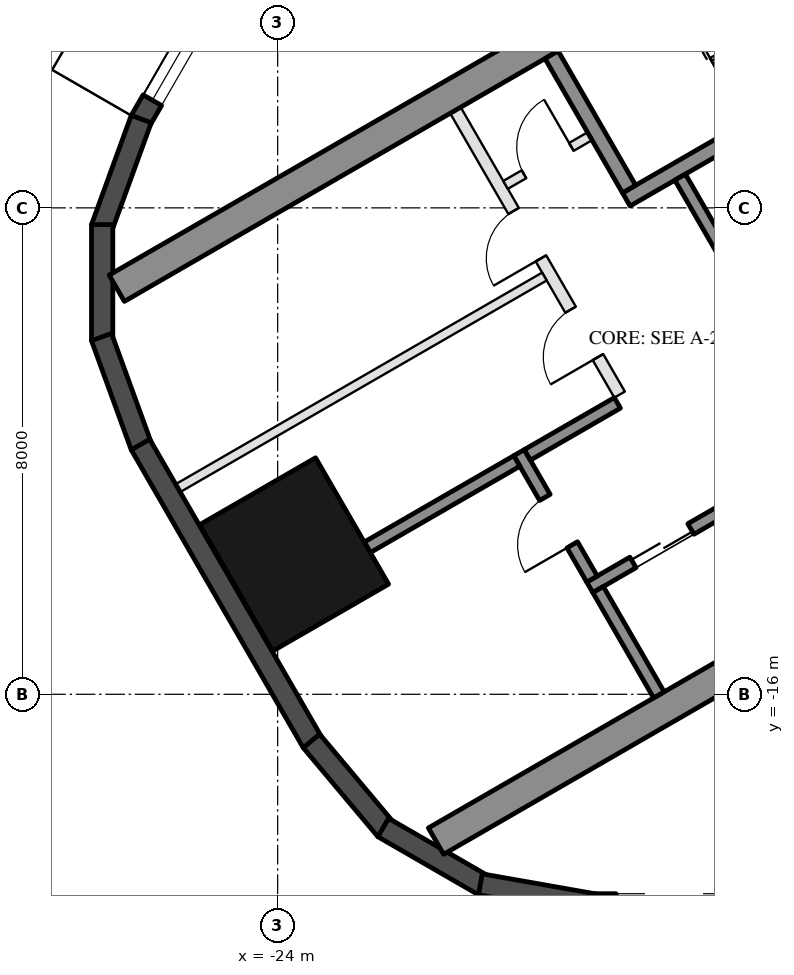
"""IFC4 building model, lengths in metres.
Left out: names, types, materials, properties, quantities, classifications, styles, units other than length and angle.
Written with IfcOpenShell. Run it as: python <this file> out.ifc"""

import sys

from ifc_helpers import new_model, si_unit, direction, frame, frame_2d, origin, origin_2d, place, context, subcontext, project, spatial, rectangle, hollow_rectangle, extrude, element, fill, save


model = new_model("IFC4")
c1 = context("Model", 3, precision=1e-05, world=origin(), true_north=direction((0.0, 1.0)))
c2 = subcontext(c1, "Body", "Model", "MODEL_VIEW")
j1 = project(units=[si_unit("LENGTHUNIT", "METRE"), si_unit("PLANEANGLEUNIT", "RADIAN")], contexts=[c1])
p1 = place(None, origin())
s1 = spatial("IfcSite", under=j1, at=p1, CompositionType="ELEMENT")
p2 = place(p1, origin())
s2 = spatial("IfcBuilding", under=s1, at=p2, CompositionType="ELEMENT")
p3 = place(p2, frame((0.0, 0.0, 187.3)))
s3 = spatial("IfcBuildingStorey", under=s2, at=p3, CompositionType="ELEMENT", Elevation=187.3)
p4 = place(p3, frame((-23.729, -13.7, 0.0), z_axis=(0.0, 0.0, 1.0), x_axis=(-0.5, 0.866025403784, 0.0)))
e1 = element("IfcColumn", 1, at=p4, inside=s3, PredefinedType="COLUMN", context=c2, shape_type="SweptSolid", body=[
    extrude(hollow_rectangle(XDim=2.4, YDim=2.2, WallThickness=0.06, at=origin_2d()), origin(), (0.0, 0.0, 1.0), 3.7),
])
p5 = place(p3, frame((-24.299, -3.176, 0.0), z_axis=(0.0, 0.0, 1.0), x_axis=(-0.500028278809, -0.866009076391, 0.0)))
e2 = element("IfcWall", 2, at=p5, inside=s3, PredefinedType="SOLIDWALL", context=c2, shape_type="SweptSolid", body=[
    extrude(rectangle(XDim=3.916, YDim=0.35, at=frame_2d((1.958, 0.0))), origin(), (0.0, 0.0, 1.0), 3.55),
])
p6 = place(p5, frame((1.625, 0.0, 0.3)))
e3 = element("IfcOpeningElement", 3, at=p6, cuts=e2, PredefinedType="OPENING", context=c2, shape_type="SweptSolid", body=[
    extrude(rectangle(XDim=1.9, YDim=2.65, at=frame_2d((0.95, 1.325))), frame((0.0, 0.185, 0.0), z_axis=(0.0, -1.0, 0.0), x_axis=(1.0, 0.0, 0.0)), (0.0, 0.0, 1.0), 0.37),
])
for number, where, z_axis, x_axis in (
    (4, (-26.244, -6.54, 0.0), (0.0, 0.0, 1.0), (-0.342, -0.94, 0.0)),
    (5, (-26.886, -8.275, 0.0), (0.0, 0.0, 1.0), (0.0, -1.0, 0.0)),
    (6, (-26.897, -10.125, 0.0), (0.0, 0.0, 1.0), (0.342, -0.94, 0.0)),
):
    element("IfcWall", number, at=place(p3, frame(where, z_axis=z_axis, x_axis=x_axis)), inside=s3, PredefinedType="SOLIDWALL", context=c2, shape_type="SweptSolid", body=[
        extrude(rectangle(XDim=1.91, YDim=0.35, at=frame_2d((0.955, 0.0))), origin(), (0.0, 0.0, 1.0), 3.55),
    ])
p7 = place(p3, frame((-26.257, -11.893, 0.0), z_axis=(0.0, 0.0, 1.0), x_axis=(0.500018773155, -0.866014564827, 0.0)))
e7 = element("IfcWall", 7, at=p7, inside=s3, PredefinedType="SOLIDWALL", context=c2, shape_type="SweptSolid", body=[
    extrude(rectangle(XDim=5.658, YDim=0.35, at=frame_2d((2.829, 0.0))), origin(), (0.0, 0.0, 1.0), 3.55),
])
for number, where, z_axis, x_axis in (
    (8, (-23.445, -16.768, 0.0), (0.0, 0.0, 1.0), (0.643, -0.766, 0.0)),
    (9, (-22.264, -18.192, 0.0), (0.0, 0.0, 1.0), (0.866, -0.5, 0.0)),
):
    element("IfcWall", number, at=place(p3, frame(where, z_axis=z_axis, x_axis=x_axis)), inside=s3, PredefinedType="SOLIDWALL", context=c2, shape_type="SweptSolid", body=[
        extrude(rectangle(XDim=1.91, YDim=0.35, at=frame_2d((0.955, 0.0))), origin(), (0.0, 0.0, 1.0), 3.55),
    ])
p8 = place(p3, frame((-20.667, -19.126, 0.0), z_axis=(0.0, 0.0, 1.0), x_axis=(0.984798995425, -0.173697837091, 0.0)))
e10 = element("IfcWall", 10, at=p8, inside=s3, PredefinedType="SOLIDWALL", context=c2, shape_type="SweptSolid", body=[
    extrude(rectangle(XDim=1.91, YDim=0.35, at=frame_2d((0.955, 0.0))), origin(), (0.0, 0.0, 1.0), 3.55),
])
p9 = place(p3, frame((-18.816, -19.455, 0.0), z_axis=(0.0, 0.0, 1.0), x_axis=(1.0, 0.0, 0.0)))
e11 = element("IfcWall", 11, at=p9, inside=s3, PredefinedType="SOLIDWALL", context=c2, shape_type="SweptSolid", body=[
    extrude(rectangle(XDim=11.816, YDim=0.35, at=frame_2d((5.908, 0.0))), origin(), (0.0, 0.0, 1.0), 3.55),
])
p10 = place(p9, frame((0.381, 0.0, 0.3)))
e12 = element("IfcOpeningElement", 12, at=p10, cuts=e11, PredefinedType="OPENING", context=c2, shape_type="SweptSolid", body=[
    extrude(rectangle(XDim=1.9, YDim=2.65, at=frame_2d((0.95, 1.325))), frame((0.0, 0.185, 0.0), z_axis=(0.0, -1.0, 0.0), x_axis=(1.0, 0.0, 0.0)), (0.0, 0.0, 1.0), 0.37),
])
p11 = place(p9, frame((7.79, 0.0, 0.0)))
e13 = element("IfcOpeningElement", 13, at=p11, cuts=e11, PredefinedType="OPENING", context=c2, shape_type="SweptSolid", body=[
    extrude(rectangle(XDim=2.4, YDim=2.4, at=frame_2d((1.2, 1.2))), frame((0.0, 0.185, 0.0), z_axis=(0.0, -1.0, 0.0), x_axis=(1.0, 0.0, 0.0)), (0.0, 0.0, 1.0), 0.37),
])
p12 = place(p9, frame((3.741, 0.0, 0.3)))
e14 = element("IfcOpeningElement", 14, at=p12, cuts=e11, PredefinedType="OPENING", context=c2, shape_type="SweptSolid", body=[
    extrude(rectangle(XDim=1.7, YDim=2.65, at=frame_2d((0.85, 1.325))), frame((0.0, 0.185, 0.0), z_axis=(0.0, -1.0, 0.0), x_axis=(1.0, 0.0, 0.0)), (0.0, 0.0, 1.0), 0.37),
])
p13 = place(p9, frame((5.741, 0.0, 0.3)))
e15 = element("IfcOpeningElement", 15, at=p13, cuts=e11, PredefinedType="OPENING", context=c2, shape_type="SweptSolid", body=[
    extrude(rectangle(XDim=1.7, YDim=2.65, at=frame_2d((0.85, 1.325))), frame((0.0, 0.185, 0.0), z_axis=(0.0, -1.0, 0.0), x_axis=(1.0, 0.0, 0.0)), (0.0, 0.0, 1.0), 0.37),
])
for number, where, z_axis, x_axis in (
    (16, (-13.797, -1.903, 0.0), (0.0, 0.0, 1.0), (-0.866, -0.5, 0.0)),
    (17, (-8.547, -10.997, 0.0), (0.0, 0.0, 1.0), (-0.866, -0.5, 0.0)),
):
    element("IfcWall", number, at=place(p3, frame(where, z_axis=z_axis, x_axis=x_axis)), inside=s3, PredefinedType="SHEAR", context=c2, shape_type="SweptSolid", body=[
        extrude(rectangle(XDim=14.837, YDim=0.5, at=frame_2d((7.418, 0.0))), origin(), (0.0, 0.0, 1.0), 3.5),
    ])
p14 = place(p3, frame((-12.681, -4.636, 0.0), z_axis=(0.0, 0.0, 1.0), x_axis=(-0.866021702275, -0.500006411147, 0.0)))
e18 = element("IfcWall", 18, at=p14, inside=s3, PredefinedType="SHEAR", context=c2, shape_type="SweptSolid", body=[
    extrude(rectangle(XDim=6.45, YDim=0.25, at=frame_2d((3.225, 0.0))), origin(), (0.0, 0.0, 1.0), 3.5),
])
p15 = place(p14, frame((0.3, 0.0, 0.0)))
e19 = element("IfcOpeningElement", 19, at=p15, cuts=e18, PredefinedType="OPENING", context=c2, shape_type="SweptSolid", body=[
    extrude(rectangle(XDim=1.0, YDim=2.1, at=frame_2d((0.5, 1.05))), frame((0.0, 0.135, 0.0), z_axis=(0.0, -1.0, 0.0), x_axis=(1.0, 0.0, 0.0)), (0.0, 0.0, 1.0), 0.27),
])
p16 = place(p3, frame((-19.496, -5.482, 0.0), z_axis=(0.0, 0.0, 1.0), x_axis=(0.499990435942, -0.866030925526, 0.0)))
e20 = element("IfcWall", 20, at=p16, inside=s3, PredefinedType="SHEAR", context=c2, shape_type="SweptSolid", body=[
    extrude(rectangle(XDim=2.55, YDim=0.25, at=frame_2d((1.275, 0.0))), origin(), (0.0, 0.0, 1.0), 3.5),
])
p17 = place(p3, frame((-17.381, -7.495, 0.0), z_axis=(0.0, 0.0, 1.0), x_axis=(0.500011755427, -0.866018616679, 0.0)))
e21 = element("IfcWall", 21, at=p17, inside=s3, PredefinedType="SHEAR", context=c2, shape_type="SweptSolid", body=[
    extrude(rectangle(XDim=2.8, YDim=0.2, at=frame_2d((1.4, 0.0))), origin(), (0.0, 0.0, 1.0), 3.5),
])
p18 = place(p3, frame((-10.068, -9.162, 0.0), z_axis=(0.0, 0.0, 1.0), x_axis=(-0.866032725843, -0.499987317609, 0.0)))
e22 = element("IfcWall", 22, at=p18, inside=s3, PredefinedType="SHEAR", context=c2, shape_type="SweptSolid", body=[
    extrude(rectangle(XDim=10.16, YDim=0.2, at=frame_2d((5.08, 0.0))), origin(), (0.0, 0.0, 1.0), 3.5),
])
p19 = place(p18, frame((0.62, 0.0, 0.0)))
e23 = element("IfcOpeningElement", 23, at=p19, cuts=e22, PredefinedType="OPENING", context=c2, shape_type="SweptSolid", body=[
    extrude(rectangle(XDim=1.1, YDim=2.1, at=frame_2d((0.55, 1.05))), frame((0.0, 0.11, 0.0), z_axis=(0.0, -1.0, 0.0), x_axis=(1.0, 0.0, 0.0)), (0.0, 0.0, 1.0), 0.22),
])
p20 = place(p18, frame((3.16, 0.0, 0.0)))
e24 = element("IfcOpeningElement", 24, at=p20, cuts=e22, PredefinedType="OPENING", context=c2, shape_type="SweptSolid", body=[
    extrude(rectangle(XDim=1.1, YDim=2.1, at=frame_2d((0.55, 1.05))), frame((0.0, 0.11, 0.0), z_axis=(0.0, -1.0, 0.0), x_axis=(1.0, 0.0, 0.0)), (0.0, 0.0, 1.0), 0.22),
])
p21 = place(p18, frame((5.7, 0.0, 0.0)))
e25 = element("IfcOpeningElement", 25, at=p21, cuts=e22, PredefinedType="OPENING", context=c2, shape_type="SweptSolid", body=[
    extrude(rectangle(XDim=1.1, YDim=2.1, at=frame_2d((0.55, 1.05))), frame((0.0, 0.11, 0.0), z_axis=(0.0, -1.0, 0.0), x_axis=(1.0, 0.0, 0.0)), (0.0, 0.0, 1.0), 0.22),
])
p22 = place(p18, frame((8.24, 0.0, 0.0)))
e26 = element("IfcOpeningElement", 26, at=p22, cuts=e22, PredefinedType="OPENING", context=c2, shape_type="SweptSolid", body=[
    extrude(rectangle(XDim=1.1, YDim=2.1, at=frame_2d((0.55, 1.05))), frame((0.0, 0.11, 0.0), z_axis=(0.0, -1.0, 0.0), x_axis=(1.0, 0.0, 0.0)), (0.0, 0.0, 1.0), 0.22),
])
p23 = place(p3, frame((-20.031, -12.026, 0.0), z_axis=(0.0, 0.0, 1.0), x_axis=(0.500033551112, -0.866006032174, 0.0)))
e27 = element("IfcWall", 27, at=p23, inside=s3, PredefinedType="SHEAR", context=c2, shape_type="SweptSolid", body=[
    extrude(rectangle(XDim=2.4, YDim=0.2, at=frame_2d((1.2, 0.0))), origin(), (0.0, 0.0, 1.0), 3.5),
])
p24 = place(p23, frame((0.85, 0.0, 0.0)))
e28 = element("IfcOpeningElement", 28, at=p24, cuts=e27, PredefinedType="OPENING", context=c2, shape_type="SweptSolid", body=[
    extrude(rectangle(XDim=0.9, YDim=2.1, at=frame_2d((0.45, 1.05))), frame((0.0, 0.11, 0.0), z_axis=(0.0, -1.0, 0.0), x_axis=(1.0, 0.0, 0.0)), (0.0, 0.0, 1.0), 0.22),
])
p25 = place(p3, frame((-18.413, -11.208, 0.0), z_axis=(0.0, 0.0, 1.0), x_axis=(-0.866038183914, -0.499977863513, 0.0)))
e29 = element("IfcWall", 29, at=p25, inside=s3, PredefinedType="SHEAR", context=c2, shape_type="SweptSolid", body=[
    extrude(rectangle(XDim=1.71, YDim=0.2, at=frame_2d((0.855, 0.0))), origin(), (0.0, 0.0, 1.0), 3.5),
])
p26 = place(p3, frame((-18.73, -14.278, 0.0), z_axis=(0.0, 0.0, 1.0), x_axis=(0.50002537861, -0.866010750942, 0.0)))
e30 = element("IfcWall", 30, at=p26, inside=s3, PredefinedType="SHEAR", context=c2, shape_type="SweptSolid", body=[
    extrude(rectangle(XDim=2.0, YDim=0.2, at=frame_2d((1.0, 0.0))), origin(), (0.0, 0.0, 1.0), 3.5),
])
p27 = place(p3, frame((-20.067, -12.163, 0.0), z_axis=(0.0, 0.0, 1.0), x_axis=(-0.866055327414, -0.49994816717, 0.0)))
e31 = element("IfcWall", 31, at=p27, inside=s3, PredefinedType="SHEAR", context=c2, shape_type="SweptSolid", body=[
    extrude(rectangle(XDim=2.84, YDim=0.2, at=frame_2d((1.42, 0.0))), origin(), (0.0, 0.0, 1.0), 3.5),
])
p28 = place(p3, frame((-21.076, -6.395, 0.0), z_axis=(0.0, 0.0, 1.0), x_axis=(0.50001468107, -0.866016927499, 0.0)))
e32 = element("IfcWall", 32, at=p28, inside=s3, PredefinedType="PARTITIONING", context=c2, shape_type="SweptSolid", body=[
    extrude(rectangle(XDim=5.4, YDim=0.2, at=frame_2d((2.7, 0.0))), origin(), (0.0, 0.0, 1.0), 3.5),
])
p29 = place(p28, frame((1.913, 0.0, 0.0)))
e33 = element("IfcOpeningElement", 33, at=p29, cuts=e32, PredefinedType="OPENING", context=c2, shape_type="SweptSolid", body=[
    extrude(rectangle(XDim=0.9, YDim=2.1, at=frame_2d((0.45, 1.05))), frame((0.0, 0.11, 0.0), z_axis=(0.0, -1.0, 0.0), x_axis=(1.0, 0.0, 0.0)), (0.0, 0.0, 1.0), 0.22),
])
p30 = place(p28, frame((3.788, 0.0, 0.0)))
e34 = element("IfcOpeningElement", 34, at=p30, cuts=e32, PredefinedType="OPENING", context=c2, shape_type="SweptSolid", body=[
    extrude(rectangle(XDim=0.9, YDim=2.1, at=frame_2d((0.45, 1.05))), frame((0.0, 0.11, 0.0), z_axis=(0.0, -1.0, 0.0), x_axis=(1.0, 0.0, 0.0)), (0.0, 0.0, 1.0), 0.22),
])
p31 = place(p3, frame((-18.866, -6.822, 0.0), z_axis=(0.0, 0.0, 1.0), x_axis=(-0.866028054938, -0.499995408039, 0.0)))
e35 = element("IfcWall", 35, at=p31, inside=s3, PredefinedType="PARTITIONING", context=c2, shape_type="SweptSolid", body=[
    extrude(rectangle(XDim=1.6, YDim=0.15, at=frame_2d((0.8, 0.0))), origin(), (0.0, 0.0, 1.0), 3.5),
])
p32 = place(p31, frame((0.35, 0.0, 0.0)))
e36 = element("IfcOpeningElement", 36, at=p32, cuts=e35, PredefinedType="OPENING", context=c2, shape_type="SweptSolid", body=[
    extrude(rectangle(XDim=0.9, YDim=2.1, at=frame_2d((0.45, 1.05))), frame((0.0, 0.085, 0.0), z_axis=(0.0, -1.0, 0.0), x_axis=(1.0, 0.0, 0.0)), (0.0, 0.0, 1.0), 0.17),
])
p33 = place(p3, frame((-19.613, -9.13, 0.0), z_axis=(0.0, 0.0, 1.0), x_axis=(-0.866031734426, -0.499989034847, 0.0)))
e37 = element("IfcWall", 37, at=p33, inside=s3, PredefinedType="PARTITIONING", context=c2, shape_type="SweptSolid", body=[
    extrude(rectangle(XDim=6.95, YDim=0.15, at=frame_2d((3.475, 0.0))), origin(), (0.0, 0.0, 1.0), 3.5),
])
p34 = place(p6, origin())
e38 = element("IfcWindow", 38, at=p34, inside=s3, PartitioningType="SINGLE_PANEL", PredefinedType="WINDOW", context=c2, shape_type="SweptSolid", body=[
    extrude(rectangle(XDim=1.9, YDim=2.65, at=frame_2d((0.95, 1.325))), frame((0.0, 0.03, 0.0), z_axis=(0.0, -1.0, 0.0), x_axis=(1.0, 0.0, 0.0)), (0.0, 0.0, 1.0), 0.06),
])
fill(e3, e38)
p35 = place(p32, frame((0.9, 0.0, 0.0), z_axis=(0.0, 0.0, 1.0), x_axis=(-1.0, 0.0, 0.0)))
e39 = element("IfcDoor", 39, at=p35, inside=s3, OperationType="SINGLE_SWING_RIGHT", PredefinedType="DOOR", context=c2, shape_type="SweptSolid", body=[
    extrude(rectangle(XDim=0.9, YDim=2.1, at=frame_2d((0.45, 1.05))), frame((0.0, 0.025, 0.0), z_axis=(0.0, -1.0, 0.0), x_axis=(1.0, 0.0, 0.0)), (0.0, 0.0, 1.0), 0.05),
])
fill(e36, e39)
p36 = place(p22, origin())
e40 = element("IfcDoor", 40, at=p36, inside=s3, OperationType="DOUBLE_DOOR_SLIDING", PredefinedType="DOOR", context=c2, shape_type="SweptSolid", body=[
    extrude(rectangle(XDim=1.1, YDim=2.1, at=frame_2d((0.55, 1.05))), frame((0.0, 0.025, 0.0), z_axis=(0.0, -1.0, 0.0), x_axis=(1.0, 0.0, 0.0)), (0.0, 0.0, 1.0), 0.05),
])
fill(e26, e40)
p37 = place(p24, frame((0.9, 0.0, 0.0), z_axis=(0.0, 0.0, 1.0), x_axis=(-1.0, 0.0, 0.0)))
e41 = element("IfcDoor", 41, at=p37, inside=s3, OperationType="SINGLE_SWING_LEFT", PredefinedType="DOOR", context=c2, shape_type="SweptSolid", body=[
    extrude(rectangle(XDim=0.9, YDim=2.1, at=frame_2d((0.45, 1.05))), frame((0.0, 0.025, 0.0), z_axis=(0.0, -1.0, 0.0), x_axis=(1.0, 0.0, 0.0)), (0.0, 0.0, 1.0), 0.05),
])
fill(e28, e41)
p38 = place(p29, frame((0.9, 0.0, 0.0), z_axis=(0.0, 0.0, 1.0), x_axis=(-1.0, 0.0, 0.0)))
e42 = element("IfcDoor", 42, at=p38, inside=s3, OperationType="SINGLE_SWING_LEFT", PredefinedType="DOOR", context=c2, shape_type="SweptSolid", body=[
    extrude(rectangle(XDim=0.9, YDim=2.1, at=frame_2d((0.45, 1.05))), frame((0.0, 0.025, 0.0), z_axis=(0.0, -1.0, 0.0), x_axis=(1.0, 0.0, 0.0)), (0.0, 0.0, 1.0), 0.05),
])
fill(e33, e42)
p39 = place(p30, frame((0.9, 0.0, 0.0), z_axis=(0.0, 0.0, 1.0), x_axis=(-1.0, 0.0, 0.0)))
e43 = element("IfcDoor", 43, at=p39, inside=s3, OperationType="SINGLE_SWING_LEFT", PredefinedType="DOOR", context=c2, shape_type="SweptSolid", body=[
    extrude(rectangle(XDim=0.9, YDim=2.1, at=frame_2d((0.45, 1.05))), frame((0.0, 0.025, 0.0), z_axis=(0.0, -1.0, 0.0), x_axis=(1.0, 0.0, 0.0)), (0.0, 0.0, 1.0), 0.05),
])
fill(e34, e43)
save(model, sys.argv[1])
